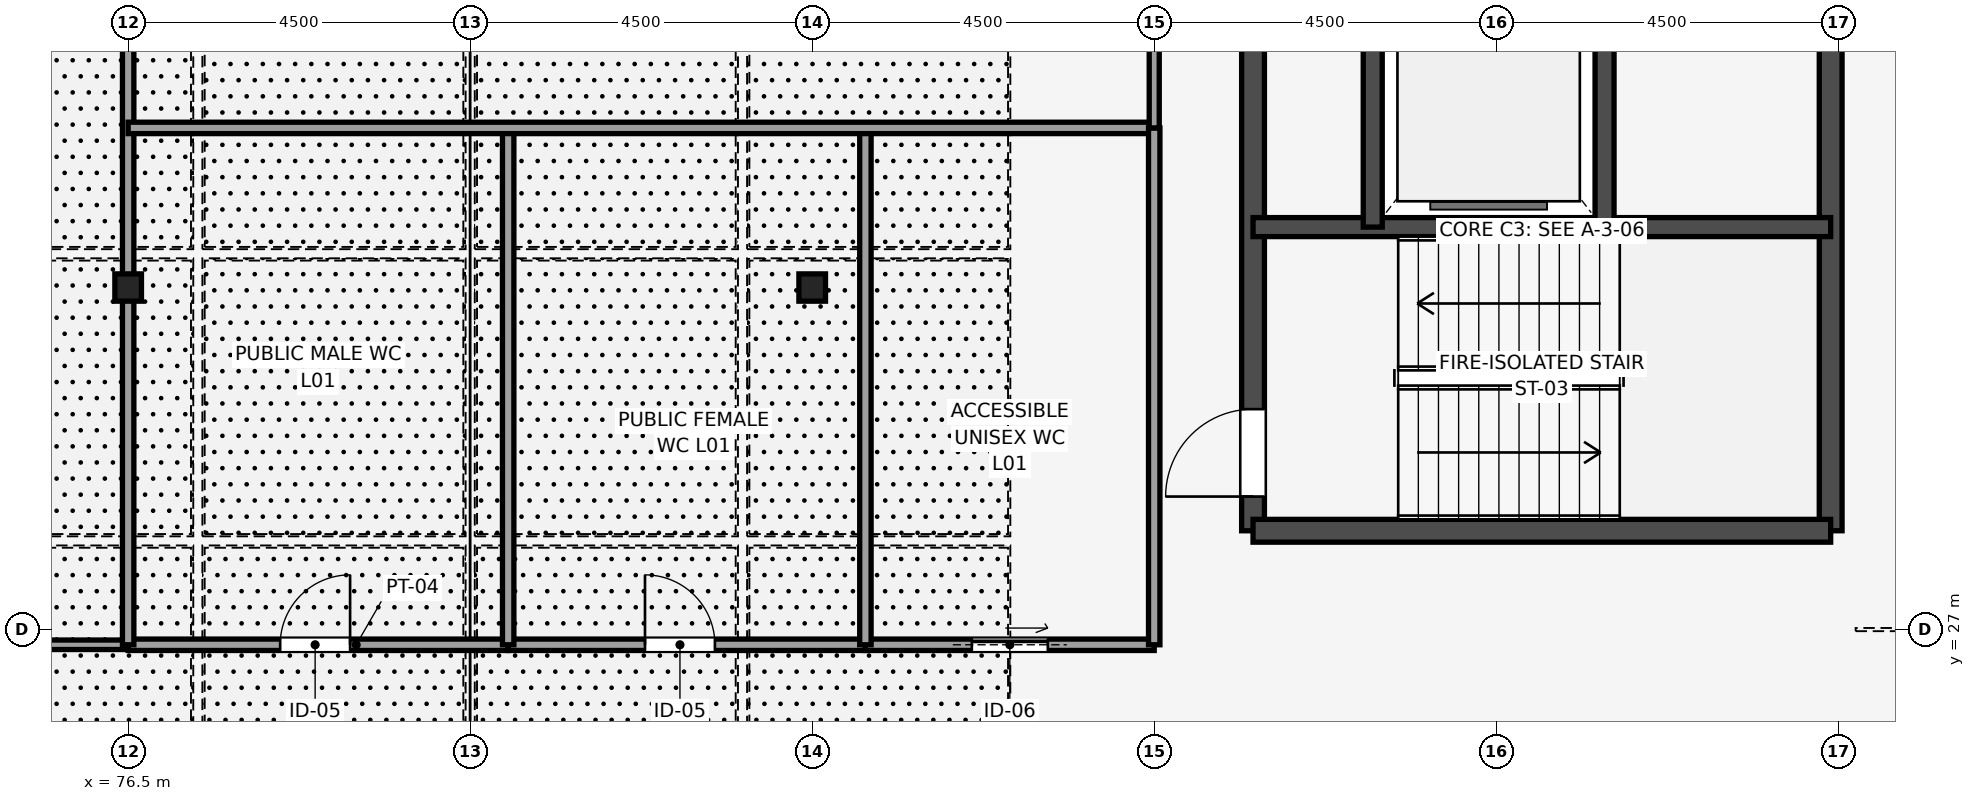
"""IFC4 building model, lengths in metres.
Left out: names, types, materials, properties, quantities, classifications, styles, units other than length and angle.
Written with IfcOpenShell. Run it as: python <this file> out.ifc"""

import sys

from ifc_helpers import new_model, si_unit, direction, frame, frame_2d, origin, origin_2d, place, context, subcontext, project, spatial, rectangle, i_section, extrude, element, fill, save


model = new_model("IFC4")
c1 = context("Model", 3, precision=1e-05, world=origin(), true_north=direction((0.0, 1.0)))
c2 = subcontext(c1, "Body", "Model", "MODEL_VIEW")
j1 = project(units=[si_unit("LENGTHUNIT", "METRE"), si_unit("PLANEANGLEUNIT", "RADIAN")], contexts=[c1])
p1 = place(None, origin())
s1 = spatial("IfcSite", under=j1, at=p1, CompositionType="ELEMENT")
p2 = place(p1, origin())
s2 = spatial("IfcBuilding", under=s1, at=p2, CompositionType="ELEMENT")
p3 = place(p2, frame((0.0, 0.0, 5.4)))
s3 = spatial("IfcBuildingStorey", under=s2, at=p3, CompositionType="ELEMENT", Elevation=5.4)
for number, where, z_axis, x_axis in (
    (1, (76.5, 31.5, 0.0), (0.0, 0.0, 1.0), (1.0, 0.0, 0.0)),
    (2, (85.5, 31.5, 0.0), (0.0, 0.0, 1.0), (1.0, 0.0, 0.0)),
):
    element("IfcColumn", number, at=place(p3, frame(where, z_axis=z_axis, x_axis=x_axis)), inside=s3, PredefinedType="COLUMN", context=c2, shape_type="SweptSolid", body=[
        extrude(i_section(OverallWidth=0.35, OverallDepth=0.359, WebThickness=0.016, FlangeThickness=0.024, FilletRadius=0.014, at=origin_2d()), origin(), (0.0, 0.0, 1.0), 4.5),
    ])
p4 = place(p3, frame((91.3, 28.3, 0.0), z_axis=(0.0, 0.0, 1.0), x_axis=(0.0, 1.0, 0.0)))
e3 = element("IfcWall", 3, at=p4, inside=s3, PredefinedType="SHEAR", context=c2, shape_type="SweptSolid", body=[
    extrude(rectangle(XDim=7.9, YDim=0.3, at=frame_2d((3.95, 0.0))), origin(), (0.0, 0.0, 1.0), 4.5),
])
p5 = place(p4, frame((0.45, 0.0, 0.0)))
e4 = element("IfcOpeningElement", 4, at=p5, cuts=e3, PredefinedType="OPENING", context=c2, shape_type="SweptSolid", body=[
    extrude(rectangle(XDim=1.15, YDim=2.15, at=frame_2d((0.575, 1.075))), frame((0.0, 0.16, 0.0), z_axis=(0.0, -1.0, 0.0), x_axis=(1.0, 0.0, 0.0)), (0.0, 0.0, 1.0), 0.32),
])
p6 = place(p3, frame((98.9, 28.3, 0.0), z_axis=(0.0, 0.0, 1.0), x_axis=(0.0, 1.0, 0.0)))
e5 = element("IfcWall", 5, at=p6, inside=s3, PredefinedType="SHEAR", context=c2, shape_type="SweptSolid", body=[
    extrude(rectangle(XDim=7.9, YDim=0.3, at=frame_2d((3.95, 0.0))), origin(), (0.0, 0.0, 1.0), 4.5),
])
p7 = place(p3, frame((91.3, 28.3, 0.0), z_axis=(0.0, 0.0, 1.0), x_axis=(1.0, 0.0, 0.0)))
e6 = element("IfcWall", 6, at=p7, inside=s3, PredefinedType="SHEAR", context=c2, shape_type="SweptSolid", body=[
    extrude(rectangle(XDim=7.6, YDim=0.3, at=frame_2d((3.8, 0.0))), origin(), (0.0, 0.0, 1.0), 4.5),
])
p8 = place(p3, frame((91.3, 32.295, 0.0), z_axis=(0.0, 0.0, 1.0), x_axis=(1.0, 0.0, 0.0)))
e7 = element("IfcWall", 7, at=p8, inside=s3, PredefinedType="SHEAR", context=c2, shape_type="SweptSolid", body=[
    extrude(rectangle(XDim=7.6, YDim=0.25, at=frame_2d((3.8, 0.0))), origin(), (0.0, 0.0, 1.0), 4.5),
])
for number, where, z_axis, x_axis in (
    (8, (92.875, 32.295, 0.0), (0.0, 0.0, 1.0), (0.0, 1.0, 0.0)),
    (9, (95.925, 32.295, 0.0), (0.0, 0.0, 1.0), (0.0, 1.0, 0.0)),
):
    element("IfcWall", number, at=place(p3, frame(where, z_axis=z_axis, x_axis=x_axis)), inside=s3, PredefinedType="SHEAR", context=c2, shape_type="SweptSolid", body=[
        extrude(rectangle(XDim=3.905, YDim=0.25, at=frame_2d((1.953, 0.0))), origin(), (0.0, 0.0, 1.0), 4.5),
    ])
p9 = place(p3, frame((58.5, 26.8, 0.0), z_axis=(0.0, 0.0, 1.0), x_axis=(1.0, 0.0, 0.0)))
e10 = element("IfcWall", 10, at=p9, inside=s3, PredefinedType="MOVABLE", context=c2, shape_type="SweptSolid", body=[
    extrude(rectangle(XDim=18.0, YDim=0.125, at=frame_2d((9.0, 0.0))), origin(), (0.0, 0.0, 1.0), 4.32),
])
p10 = place(p9, frame((5.2, 0.0, 0.0)))
e11 = element("IfcOpeningElement", 11, at=p10, cuts=e10, PredefinedType="OPENING", context=c2, shape_type="SweptSolid", body=[
    extrude(rectangle(XDim=2.0, YDim=2.4, at=frame_2d((1.0, 1.2))), frame((0.0, 0.073, 0.0), z_axis=(0.0, -1.0, 0.0), x_axis=(1.0, 0.0, 0.0)), (0.0, 0.0, 1.0), 0.145),
])
p11 = place(p3, frame((76.5, 26.8, 0.0), z_axis=(0.0, 0.0, 1.0), x_axis=(1.0, 0.0, 0.0)))
e12 = element("IfcWall", 12, at=p11, inside=s3, PredefinedType="PARTITIONING", context=c2, shape_type="SweptSolid", body=[
    extrude(rectangle(XDim=5.0, YDim=0.15, at=frame_2d((2.5, 0.0))), origin(), (0.0, 0.0, 1.0), 4.32),
])
p12 = place(p11, frame((2.0, 0.0, 0.0)))
e13 = element("IfcOpeningElement", 13, at=p12, cuts=e12, PredefinedType="OPENING", context=c2, shape_type="SweptSolid", body=[
    extrude(rectangle(XDim=0.92, YDim=2.15, at=frame_2d((0.46, 1.075))), frame((0.0, 0.085, 0.0), z_axis=(0.0, -1.0, 0.0), x_axis=(1.0, 0.0, 0.0)), (0.0, 0.0, 1.0), 0.17),
])
p13 = place(p3, frame((81.5, 26.8, 0.0), z_axis=(0.0, 0.0, 1.0), x_axis=(1.0, 0.0, 0.0)))
e14 = element("IfcWall", 14, at=p13, inside=s3, PredefinedType="PARTITIONING", context=c2, shape_type="SweptSolid", body=[
    extrude(rectangle(XDim=4.7, YDim=0.15, at=frame_2d((2.35, 0.0))), origin(), (0.0, 0.0, 1.0), 4.32),
])
p14 = place(p13, frame((1.8, 0.0, 0.0)))
e15 = element("IfcOpeningElement", 15, at=p14, cuts=e14, PredefinedType="OPENING", context=c2, shape_type="SweptSolid", body=[
    extrude(rectangle(XDim=0.92, YDim=2.15, at=frame_2d((0.46, 1.075))), frame((0.0, 0.085, 0.0), z_axis=(0.0, -1.0, 0.0), x_axis=(1.0, 0.0, 0.0)), (0.0, 0.0, 1.0), 0.17),
])
p15 = place(p3, frame((86.2, 26.8, 0.0), z_axis=(0.0, 0.0, 1.0), x_axis=(1.0, 0.0, 0.0)))
e16 = element("IfcWall", 16, at=p15, inside=s3, PredefinedType="PARTITIONING", context=c2, shape_type="SweptSolid", body=[
    extrude(rectangle(XDim=3.8, YDim=0.15, at=frame_2d((1.9, 0.0))), origin(), (0.0, 0.0, 1.0), 4.32),
])
p16 = place(p15, frame((1.4, 0.0, 0.0)))
e17 = element("IfcOpeningElement", 17, at=p16, cuts=e16, PredefinedType="OPENING", context=c2, shape_type="SweptSolid", body=[
    extrude(rectangle(XDim=1.0, YDim=2.15, at=frame_2d((0.5, 1.075))), frame((0.0, 0.085, 0.0), z_axis=(0.0, -1.0, 0.0), x_axis=(1.0, 0.0, 0.0)), (0.0, 0.0, 1.0), 0.17),
])
p17 = place(p3, frame((76.5, 26.8, 0.0), z_axis=(0.0, 0.0, 1.0), x_axis=(0.0, 1.0, 0.0)))
e18 = element("IfcWall", 18, at=p17, inside=s3, PredefinedType="PARTITIONING", context=c2, shape_type="SweptSolid", body=[
    extrude(rectangle(XDim=13.7, YDim=0.15, at=frame_2d((6.85, 0.0))), origin(), (0.0, 0.0, 1.0), 3.772),
])
for number, where, z_axis, x_axis in (
    (19, (81.5, 26.8, 0.0), (0.0, 0.0, 1.0), (0.0, 1.0, 0.0)),
    (20, (86.2, 26.8, 0.0), (0.0, 0.0, 1.0), (0.0, 1.0, 0.0)),
):
    element("IfcWall", number, at=place(p3, frame(where, z_axis=z_axis, x_axis=x_axis)), inside=s3, PredefinedType="PARTITIONING", context=c2, shape_type="SweptSolid", body=[
        extrude(rectangle(XDim=6.8, YDim=0.15, at=frame_2d((3.4, 0.0))), origin(), (0.0, 0.0, 1.0), 4.32),
    ])
p18 = place(p3, frame((76.5, 33.6, 0.0), z_axis=(0.0, 0.0, 1.0), x_axis=(1.0, 0.0, 0.0)))
e21 = element("IfcWall", 21, at=p18, inside=s3, PredefinedType="PARTITIONING", context=c2, shape_type="SweptSolid", body=[
    extrude(rectangle(XDim=13.5, YDim=0.15, at=frame_2d((6.75, 0.0))), origin(), (0.0, 0.0, 1.0), 4.32),
])
p19 = place(p3, frame((90.0, 26.8, 0.0), z_axis=(0.0, 0.0, 1.0), x_axis=(0.0, 1.0, 0.0)))
e22 = element("IfcWall", 22, at=p19, inside=s3, PredefinedType="PARTITIONING", context=c2, shape_type="SweptSolid", body=[
    extrude(rectangle(XDim=6.8, YDim=0.15, at=frame_2d((3.4, 0.0))), origin(), (0.0, 0.0, 1.0), 4.32),
])
p20 = place(p3, frame((90.0, 33.6, 0.0), z_axis=(0.0, 0.0, 1.0), x_axis=(0.0, 1.0, 0.0)))
e23 = element("IfcWall", 23, at=p20, inside=s3, PredefinedType="PARTITIONING", context=c2, shape_type="SweptSolid", body=[
    extrude(rectangle(XDim=6.9, YDim=0.132, at=frame_2d((3.45, 0.0))), origin(), (0.0, 0.0, 1.0), 4.32),
])
p21 = place(p20, frame((2.8, 0.0, 0.0)))
e24 = element("IfcOpeningElement", 24, at=p21, cuts=e23, PredefinedType="OPENING", context=c2, shape_type="SweptSolid", body=[
    extrude(rectangle(XDim=0.95, YDim=2.15, at=frame_2d((0.475, 1.075))), frame((0.0, 0.076, 0.0), z_axis=(0.0, -1.0, 0.0), x_axis=(1.0, 0.0, 0.0)), (0.0, 0.0, 1.0), 0.152),
])
p22 = place(p5, origin())
e25 = element("IfcDoor", 25, at=p22, inside=s3, OperationType="SINGLE_SWING_LEFT", PredefinedType="DOOR", context=c2, shape_type="SweptSolid", body=[
    extrude(rectangle(XDim=1.15, YDim=2.15, at=frame_2d((0.575, 1.075))), frame((0.0, 0.025, 0.0), z_axis=(0.0, -1.0, 0.0), x_axis=(1.0, 0.0, 0.0)), (0.0, 0.0, 1.0), 0.05),
])
fill(e4, e25)
p23 = place(p12, origin())
e26 = element("IfcDoor", 26, at=p23, inside=s3, OperationType="SINGLE_SWING_RIGHT", PredefinedType="DOOR", context=c2, shape_type="SweptSolid", body=[
    extrude(rectangle(XDim=0.92, YDim=2.15, at=frame_2d((0.46, 1.075))), frame((0.0, 0.025, 0.0), z_axis=(0.0, -1.0, 0.0), x_axis=(1.0, 0.0, 0.0)), (0.0, 0.0, 1.0), 0.05),
])
fill(e13, e26)
p24 = place(p14, origin())
e27 = element("IfcDoor", 27, at=p24, inside=s3, OperationType="SINGLE_SWING_LEFT", PredefinedType="DOOR", context=c2, shape_type="SweptSolid", body=[
    extrude(rectangle(XDim=0.92, YDim=2.15, at=frame_2d((0.46, 1.075))), frame((0.0, 0.025, 0.0), z_axis=(0.0, -1.0, 0.0), x_axis=(1.0, 0.0, 0.0)), (0.0, 0.0, 1.0), 0.05),
])
fill(e15, e27)
p25 = place(p16, origin())
e28 = element("IfcDoor", 28, at=p25, inside=s3, OperationType="SLIDING_TO_LEFT", PredefinedType="DOOR", context=c2, shape_type="SweptSolid", body=[
    extrude(rectangle(XDim=1.0, YDim=2.15, at=frame_2d((0.5, 1.075))), frame((0.0, 0.025, 0.0), z_axis=(0.0, -1.0, 0.0), x_axis=(1.0, 0.0, 0.0)), (0.0, 0.0, 1.0), 0.05),
])
fill(e17, e28)
save(model, sys.argv[1])
